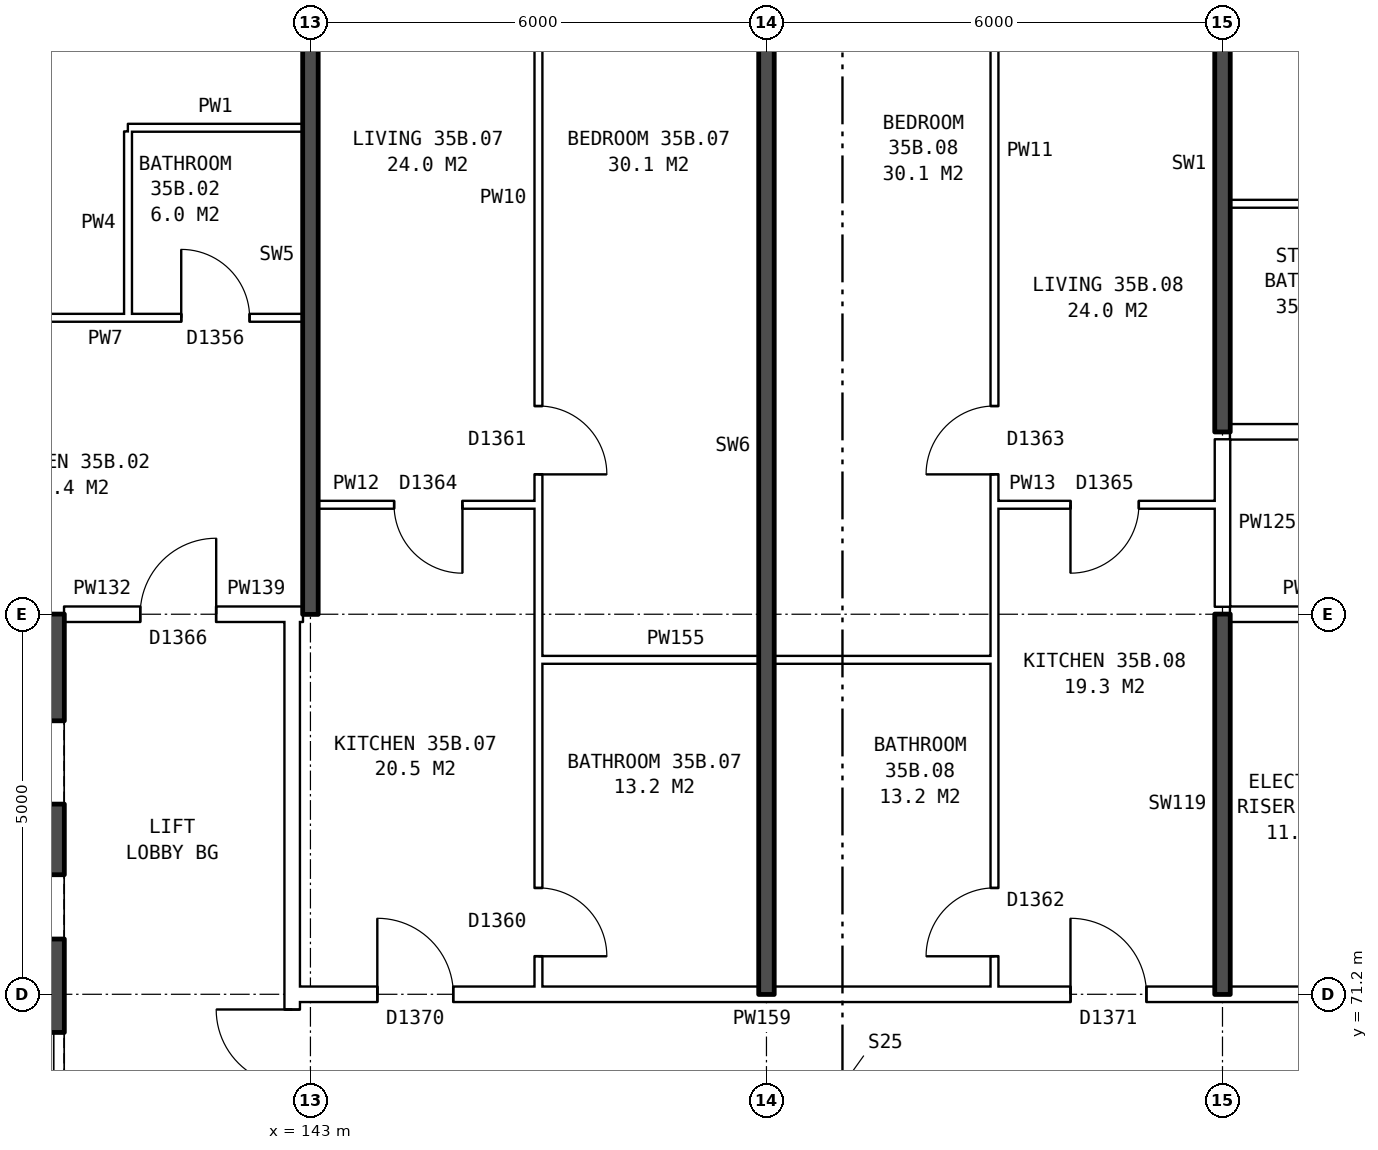
"""IFC4 building model, lengths in metres.
Left out: names, types, materials, properties, quantities, classifications, styles, units other than length and angle.
Written with IfcOpenShell. Run it as: python <this file> out.ifc"""

import sys

from ifc_helpers import new_model, si_unit, direction, frame, frame_2d, origin, place, context, subcontext, project, spatial, rectangle, extrude, element, fill, save


model = new_model("IFC4")
c1 = context("Model", 3, precision=1e-05, world=origin(), true_north=direction((0.0, 1.0)))
c2 = subcontext(c1, "Body", "Model", "MODEL_VIEW")
j1 = project(units=[si_unit("LENGTHUNIT", "METRE"), si_unit("PLANEANGLEUNIT", "RADIAN")], contexts=[c1])
p1 = place(None, origin())
s1 = spatial("IfcSite", under=j1, at=p1, CompositionType="ELEMENT")
p2 = place(p1, origin())
s2 = spatial("IfcBuilding", under=s1, at=p2, CompositionType="ELEMENT")
p3 = place(p2, frame((0.0, 0.0, 126.8)))
s3 = spatial("IfcBuildingStorey", under=s2, at=p3, CompositionType="ELEMENT", Elevation=126.8)
p4 = place(p3, frame((139.485, 63.8, 0.0), z_axis=(0.0, 0.0, 1.0), x_axis=(0.0, 1.0, 0.0)))
e1 = element("IfcWall", 1, at=p4, inside=s3, PredefinedType="SHEAR", context=c2, shape_type="SweptSolid", body=[
    extrude(rectangle(XDim=12.4, YDim=0.55, at=frame_2d((6.2, 0.0))), origin(), (0.0, 0.0, 1.0), 2.85),
])
p5 = place(p4, frame((1.325, 0.0, 0.0)))
e2 = element("IfcOpeningElement", 2, at=p5, cuts=e1, PredefinedType="OPENING", context=c2, shape_type="SweptSolid", body=[
    extrude(rectangle(XDim=1.1, YDim=2.1, at=frame_2d((0.55, 1.05))), frame((0.0, 0.285, 0.0), z_axis=(0.0, -1.0, 0.0), x_axis=(1.0, 0.0, 0.0)), (0.0, 0.0, 1.0), 0.57),
])
p6 = place(p4, frame((3.6, 0.0, 0.0)))
e3 = element("IfcOpeningElement", 3, at=p6, cuts=e1, PredefinedType="OPENING", context=c2, shape_type="SweptSolid", body=[
    extrude(rectangle(XDim=1.1, YDim=2.1, at=frame_2d((0.55, 1.05))), frame((0.0, 0.285, 0.0), z_axis=(0.0, -1.0, 0.0), x_axis=(1.0, 0.0, 0.0)), (0.0, 0.0, 1.0), 0.57),
])
p7 = place(p4, frame((5.8, 0.0, 0.0)))
e4 = element("IfcOpeningElement", 4, at=p7, cuts=e1, PredefinedType="OPENING", context=c2, shape_type="SweptSolid", body=[
    extrude(rectangle(XDim=1.1, YDim=2.1, at=frame_2d((0.55, 1.05))), frame((0.0, 0.285, 0.0), z_axis=(0.0, -1.0, 0.0), x_axis=(1.0, 0.0, 0.0)), (0.0, 0.0, 1.0), 0.57),
])
p8 = place(p4, frame((9.9, 0.0, 0.0)))
e5 = element("IfcOpeningElement", 5, at=p8, cuts=e1, PredefinedType="OPENING", context=c2, shape_type="SweptSolid", body=[
    extrude(rectangle(XDim=1.1, YDim=2.1, at=frame_2d((0.55, 1.05))), frame((0.0, 0.285, 0.0), z_axis=(0.0, -1.0, 0.0), x_axis=(1.0, 0.0, 0.0)), (0.0, 0.0, 1.0), 0.57),
])
p9 = place(p4, frame((8.125, 0.0, 0.0)))
e6 = element("IfcOpeningElement", 6, at=p9, cuts=e1, PredefinedType="OPENING", context=c2, shape_type="SweptSolid", body=[
    extrude(rectangle(XDim=0.85, YDim=2.1, at=frame_2d((0.425, 1.05))), frame((0.0, 0.285, 0.0), z_axis=(0.0, -1.0, 0.0), x_axis=(1.0, 0.0, 0.0)), (0.0, 0.0, 1.0), 0.57),
])
p10 = place(p3, frame((142.76, 63.9, 0.0), z_axis=(0.0, 0.0, 1.0), x_axis=(0.0, 1.0, 0.0)))
e7 = element("IfcWall", 7, at=p10, inside=s3, PredefinedType="PARTITIONING", context=c2, shape_type="SweptSolid", body=[
    extrude(rectangle(XDim=12.2, YDim=0.2, at=frame_2d((6.1, 0.0))), origin(), (0.0, 0.0, 1.0), 2.85),
])
p11 = place(p10, frame((5.1, 0.0, 0.0)))
e8 = element("IfcOpeningElement", 8, at=p11, cuts=e7, PredefinedType="OPENING", context=c2, shape_type="SweptSolid", body=[
    extrude(rectangle(XDim=2.0, YDim=2.1, at=frame_2d((1.0, 1.05))), frame((0.0, 0.11, 0.0), z_axis=(0.0, -1.0, 0.0), x_axis=(1.0, 0.0, 0.0)), (0.0, 0.0, 1.0), 0.22),
])
p12 = place(p3, frame((142.76, 71.2, 0.0), z_axis=(0.0, 0.0, 1.0), x_axis=(1.0, 0.0, 0.0)))
e9 = element("IfcWall", 9, at=p12, inside=s3, PredefinedType="PARTITIONING", context=c2, shape_type="SweptSolid", body=[
    extrude(rectangle(XDim=14.48, YDim=0.2, at=frame_2d((7.24, 0.0))), origin(), (0.0, 0.0, 1.0), 2.85),
])
p13 = place(p12, frame((1.12, 0.0, 0.0)))
e10 = element("IfcOpeningElement", 10, at=p13, cuts=e9, PredefinedType="OPENING", context=c2, shape_type="SweptSolid", body=[
    extrude(rectangle(XDim=1.0, YDim=2.1, at=frame_2d((0.5, 1.05))), frame((0.0, 0.11, 0.0), z_axis=(0.0, -1.0, 0.0), x_axis=(1.0, 0.0, 0.0)), (0.0, 0.0, 1.0), 0.22),
])
p14 = place(p12, frame((10.24, 0.0, 0.0)))
e11 = element("IfcOpeningElement", 11, at=p14, cuts=e9, PredefinedType="OPENING", context=c2, shape_type="SweptSolid", body=[
    extrude(rectangle(XDim=1.0, YDim=2.1, at=frame_2d((0.5, 1.05))), frame((0.0, 0.11, 0.0), z_axis=(0.0, -1.0, 0.0), x_axis=(1.0, 0.0, 0.0)), (0.0, 0.0, 1.0), 0.22),
])
p15 = place(p3, frame((146.0, 75.6, 0.0), z_axis=(0.0, 0.0, 1.0), x_axis=(1.0, 0.0, 0.0)))
e12 = element("IfcWall", 12, at=p15, inside=s3, PredefinedType="PARTITIONING", context=c2, shape_type="SweptSolid", body=[
    extrude(rectangle(XDim=6.0, YDim=0.1, at=frame_2d((3.0, 0.0))), origin(), (0.0, 0.0, 1.0), 2.85),
])
p16 = place(p3, frame((139.76, 76.2, 0.0), z_axis=(0.0, 0.0, 1.0), x_axis=(1.0, 0.0, 0.0)))
e13 = element("IfcWall", 13, at=p16, inside=s3, PredefinedType="PARTITIONING", context=c2, shape_type="SweptSolid", body=[
    extrude(rectangle(XDim=3.0, YDim=0.2, at=frame_2d((1.5, 0.0))), origin(), (0.0, 0.0, 1.0), 2.85),
])
p17 = place(p16, frame((1.0, 0.0, 0.0)))
e14 = element("IfcOpeningElement", 14, at=p17, cuts=e13, PredefinedType="OPENING", context=c2, shape_type="SweptSolid", body=[
    extrude(rectangle(XDim=1.0, YDim=2.1, at=frame_2d((0.5, 1.05))), frame((0.0, 0.11, 0.0), z_axis=(0.0, -1.0, 0.0), x_axis=(1.0, 0.0, 0.0)), (0.0, 0.0, 1.0), 0.22),
])
p18 = place(p3, frame((142.76, 76.2, 0.0), z_axis=(0.0, 0.0, 1.0), x_axis=(1.0, 0.0, 0.0)))
e15 = element("IfcWall", 15, at=p18, inside=s3, PredefinedType="PARTITIONING", context=c2, shape_type="SweptSolid", body=[
    extrude(rectangle(XDim=0.14, YDim=0.2, at=frame_2d((0.07, 0.0))), origin(), (0.0, 0.0, 1.0), 2.85),
])
p19 = place(p3, frame((155.1, 76.2, 0.0), z_axis=(0.0, 0.0, 1.0), x_axis=(1.0, 0.0, 0.0)))
e16 = element("IfcWall", 16, at=p19, inside=s3, PredefinedType="PARTITIONING", context=c2, shape_type="SweptSolid", body=[
    extrude(rectangle(XDim=2.14, YDim=0.2, at=frame_2d((1.07, 0.0))), origin(), (0.0, 0.0, 1.0), 2.85),
])
p20 = place(p3, frame((143.1, 77.64, 0.0), z_axis=(0.0, 0.0, 1.0), x_axis=(1.0, 0.0, 0.0)))
e17 = element("IfcWall", 17, at=p20, inside=s3, PredefinedType="PARTITIONING", context=c2, shape_type="SweptSolid", body=[
    extrude(rectangle(XDim=2.9, YDim=0.1, at=frame_2d((1.45, 0.0))), origin(), (0.0, 0.0, 1.0), 2.85),
])
p21 = place(p20, frame((1.0, 0.0, 0.0)))
e18 = element("IfcOpeningElement", 18, at=p21, cuts=e17, PredefinedType="OPENING", context=c2, shape_type="SweptSolid", body=[
    extrude(rectangle(XDim=0.9, YDim=2.1, at=frame_2d((0.45, 1.05))), frame((0.0, 0.06, 0.0), z_axis=(0.0, -1.0, 0.0), x_axis=(1.0, 0.0, 0.0)), (0.0, 0.0, 1.0), 0.12),
])
p22 = place(p3, frame((152.0, 77.64, 0.0), z_axis=(0.0, 0.0, 1.0), x_axis=(1.0, 0.0, 0.0)))
e19 = element("IfcWall", 19, at=p22, inside=s3, PredefinedType="PARTITIONING", context=c2, shape_type="SweptSolid", body=[
    extrude(rectangle(XDim=2.9, YDim=0.1, at=frame_2d((1.45, 0.0))), origin(), (0.0, 0.0, 1.0), 2.85),
])
p23 = place(p22, frame((1.0, 0.0, 0.0)))
e20 = element("IfcOpeningElement", 20, at=p23, cuts=e19, PredefinedType="OPENING", context=c2, shape_type="SweptSolid", body=[
    extrude(rectangle(XDim=0.9, YDim=2.1, at=frame_2d((0.45, 1.05))), frame((0.0, 0.06, 0.0), z_axis=(0.0, -1.0, 0.0), x_axis=(1.0, 0.0, 0.0)), (0.0, 0.0, 1.0), 0.12),
])
p24 = place(p3, frame((155.1, 78.6, 0.0), z_axis=(0.0, 0.0, 1.0), x_axis=(1.0, 0.0, 0.0)))
e21 = element("IfcWall", 21, at=p24, inside=s3, PredefinedType="PARTITIONING", context=c2, shape_type="SweptSolid", body=[
    extrude(rectangle(XDim=17.29, YDim=0.2, at=frame_2d((8.645, 0.0))), origin(), (0.0, 0.0, 1.0), 2.85),
])
p25 = place(p24, frame((3.6, 0.0, 0.0)))
e22 = element("IfcOpeningElement", 22, at=p25, cuts=e21, PredefinedType="OPENING", context=c2, shape_type="SweptSolid", body=[
    extrude(rectangle(XDim=1.0, YDim=2.1, at=frame_2d((0.5, 1.05))), frame((0.0, 0.11, 0.0), z_axis=(0.0, -1.0, 0.0), x_axis=(1.0, 0.0, 0.0)), (0.0, 0.0, 1.0), 0.22),
])
p26 = place(p24, frame((8.4, 0.0, 0.0)))
e23 = element("IfcOpeningElement", 23, at=p26, cuts=e21, PredefinedType="OPENING", context=c2, shape_type="SweptSolid", body=[
    extrude(rectangle(XDim=1.0, YDim=2.1, at=frame_2d((0.5, 1.05))), frame((0.0, 0.11, 0.0), z_axis=(0.0, -1.0, 0.0), x_axis=(1.0, 0.0, 0.0)), (0.0, 0.0, 1.0), 0.22),
])
p27 = place(p3, frame((137.1, 80.1, 0.0), z_axis=(0.0, 0.0, 1.0), x_axis=(1.0, 0.0, 0.0)))
e24 = element("IfcWall", 24, at=p27, inside=s3, PredefinedType="PARTITIONING", context=c2, shape_type="SweptSolid", body=[
    extrude(rectangle(XDim=5.8, YDim=0.1, at=frame_2d((2.9, 0.0))), origin(), (0.0, 0.0, 1.0), 2.85),
])
p28 = place(p27, frame((1.3, 0.0, 0.0)))
e25 = element("IfcOpeningElement", 25, at=p28, cuts=e24, PredefinedType="OPENING", context=c2, shape_type="SweptSolid", body=[
    extrude(rectangle(XDim=0.9, YDim=2.1, at=frame_2d((0.45, 1.05))), frame((0.0, 0.06, 0.0), z_axis=(0.0, -1.0, 0.0), x_axis=(1.0, 0.0, 0.0)), (0.0, 0.0, 1.0), 0.12),
])
p29 = place(p27, frame((4.2, 0.0, 0.0)))
e26 = element("IfcOpeningElement", 26, at=p29, cuts=e24, PredefinedType="OPENING", context=c2, shape_type="SweptSolid", body=[
    extrude(rectangle(XDim=0.9, YDim=2.1, at=frame_2d((0.45, 1.05))), frame((0.0, 0.06, 0.0), z_axis=(0.0, -1.0, 0.0), x_axis=(1.0, 0.0, 0.0)), (0.0, 0.0, 1.0), 0.12),
])
for number, where, z_axis, x_axis in (
    (27, (155.1, 81.6, 0.0), (0.0, 0.0, 1.0), (1.0, 0.0, 0.0)),
    (28, (140.6, 82.6, 0.0), (0.0, 0.0, 1.0), (1.0, 0.0, 0.0)),
):
    element("IfcWall", number, at=place(p3, frame(where, z_axis=z_axis, x_axis=x_axis)), inside=s3, PredefinedType="PARTITIONING", context=c2, shape_type="SweptSolid", body=[
        extrude(rectangle(XDim=2.3, YDim=0.1, at=frame_2d((1.15, 0.0))), origin(), (0.0, 0.0, 1.0), 2.85),
    ])
p30 = place(p3, frame((140.6, 80.15, 0.0), z_axis=(0.0, 0.0, 1.0), x_axis=(0.0, 1.0, 0.0)))
e29 = element("IfcWall", 29, at=p30, inside=s3, PredefinedType="PARTITIONING", context=c2, shape_type="SweptSolid", body=[
    extrude(rectangle(XDim=2.4, YDim=0.1, at=frame_2d((1.2, 0.0))), origin(), (0.0, 0.0, 1.0), 2.85),
])
p31 = place(p3, frame((143.0, 76.2, 0.0), z_axis=(0.0, 0.0, 1.0), x_axis=(0.0, 1.0, 0.0)))
e30 = element("IfcWall", 30, at=p31, inside=s3, PredefinedType="SOLIDWALL", context=c2, shape_type="SweptSolid", body=[
    extrude(rectangle(XDim=9.44, YDim=0.2, at=frame_2d((4.72, 0.0))), origin(), (0.0, 0.0, 1.0), 2.85),
])
p32 = place(p3, frame((146.0, 71.3, 0.0), z_axis=(0.0, 0.0, 1.0), x_axis=(0.0, 1.0, 0.0)))
e31 = element("IfcWall", 31, at=p32, inside=s3, PredefinedType="PARTITIONING", context=c2, shape_type="SweptSolid", body=[
    extrude(rectangle(XDim=14.34, YDim=0.1, at=frame_2d((7.17, 0.0))), origin(), (0.0, 0.0, 1.0), 2.85),
])
p33 = place(p32, frame((6.74, 0.0, 0.0)))
e32 = element("IfcOpeningElement", 32, at=p33, cuts=e31, PredefinedType="OPENING", context=c2, shape_type="SweptSolid", body=[
    extrude(rectangle(XDim=0.9, YDim=2.1, at=frame_2d((0.45, 1.05))), frame((0.0, 0.06, 0.0), z_axis=(0.0, -1.0, 0.0), x_axis=(1.0, 0.0, 0.0)), (0.0, 0.0, 1.0), 0.12),
])
p34 = place(p32, frame((0.4, 0.0, 0.0)))
e33 = element("IfcOpeningElement", 33, at=p34, cuts=e31, PredefinedType="OPENING", context=c2, shape_type="SweptSolid", body=[
    extrude(rectangle(XDim=0.9, YDim=2.1, at=frame_2d((0.45, 1.05))), frame((0.0, 0.06, 0.0), z_axis=(0.0, -1.0, 0.0), x_axis=(1.0, 0.0, 0.0)), (0.0, 0.0, 1.0), 0.12),
])
p35 = place(p3, frame((149.0, 71.2, 0.0), z_axis=(0.0, 0.0, 1.0), x_axis=(0.0, 1.0, 0.0)))
e34 = element("IfcWall", 34, at=p35, inside=s3, PredefinedType="SOLIDWALL", context=c2, shape_type="SweptSolid", body=[
    extrude(rectangle(XDim=14.44, YDim=0.2, at=frame_2d((7.22, 0.0))), origin(), (0.0, 0.0, 1.0), 2.85),
])
p36 = place(p3, frame((152.0, 71.3, 0.0), z_axis=(0.0, 0.0, 1.0), x_axis=(0.0, 1.0, 0.0)))
e35 = element("IfcWall", 35, at=p36, inside=s3, PredefinedType="PARTITIONING", context=c2, shape_type="SweptSolid", body=[
    extrude(rectangle(XDim=14.34, YDim=0.1, at=frame_2d((7.17, 0.0))), origin(), (0.0, 0.0, 1.0), 2.85),
])
p37 = place(p36, frame((6.74, 0.0, 0.0)))
e36 = element("IfcOpeningElement", 36, at=p37, cuts=e35, PredefinedType="OPENING", context=c2, shape_type="SweptSolid", body=[
    extrude(rectangle(XDim=0.9, YDim=2.1, at=frame_2d((0.45, 1.05))), frame((0.0, 0.06, 0.0), z_axis=(0.0, -1.0, 0.0), x_axis=(1.0, 0.0, 0.0)), (0.0, 0.0, 1.0), 0.12),
])
p38 = place(p36, frame((0.4, 0.0, 0.0)))
e37 = element("IfcOpeningElement", 37, at=p38, cuts=e35, PredefinedType="OPENING", context=c2, shape_type="SweptSolid", body=[
    extrude(rectangle(XDim=0.9, YDim=2.1, at=frame_2d((0.45, 1.05))), frame((0.0, 0.06, 0.0), z_axis=(0.0, -1.0, 0.0), x_axis=(1.0, 0.0, 0.0)), (0.0, 0.0, 1.0), 0.12),
])
p39 = place(p3, frame((155.0, 71.2, 0.0), z_axis=(0.0, 0.0, 1.0), x_axis=(0.0, 1.0, 0.0)))
e38 = element("IfcWall", 38, at=p39, inside=s3, PredefinedType="SOLIDWALL", context=c2, shape_type="SweptSolid", body=[
    extrude(rectangle(XDim=5.0, YDim=0.2, at=frame_2d((2.5, 0.0))), origin(), (0.0, 0.0, 1.0), 2.85),
])
p40 = place(p3, frame((155.0, 76.3, 0.0), z_axis=(0.0, 0.0, 1.0), x_axis=(0.0, 1.0, 0.0)))
e39 = element("IfcWall", 39, at=p40, inside=s3, PredefinedType="PARTITIONING", context=c2, shape_type="SweptSolid", body=[
    extrude(rectangle(XDim=2.2, YDim=0.2, at=frame_2d((1.1, 0.0))), origin(), (0.0, 0.0, 1.0), 2.85),
])
p41 = place(p3, frame((155.0, 78.6, 0.0), z_axis=(0.0, 0.0, 1.0), x_axis=(0.0, 1.0, 0.0)))
e40 = element("IfcWall", 40, at=p41, inside=s3, PredefinedType="SOLIDWALL", context=c2, shape_type="SweptSolid", body=[
    extrude(rectangle(XDim=7.04, YDim=0.2, at=frame_2d((3.52, 0.0))), origin(), (0.0, 0.0, 1.0), 2.85),
])
p42 = place(p11, origin())
e41 = element("IfcDoor", 41, at=p42, inside=s3, OperationType="DOUBLE_DOOR_SINGLE_SWING", PredefinedType="DOOR", context=c2, shape_type="SweptSolid", body=[
    extrude(rectangle(XDim=2.0, YDim=2.1, at=frame_2d((1.0, 1.05))), frame((0.0, 0.025, 0.0), z_axis=(0.0, -1.0, 0.0), x_axis=(1.0, 0.0, 0.0)), (0.0, 0.0, 1.0), 0.05),
])
fill(e8, e41)
p43 = place(p17, origin())
e42 = element("IfcDoor", 42, at=p43, inside=s3, OperationType="SINGLE_SWING_RIGHT", PredefinedType="DOOR", context=c2, shape_type="SweptSolid", body=[
    extrude(rectangle(XDim=1.0, YDim=2.1, at=frame_2d((0.5, 1.05))), frame((0.0, 0.025, 0.0), z_axis=(0.0, -1.0, 0.0), x_axis=(1.0, 0.0, 0.0)), (0.0, 0.0, 1.0), 0.05),
])
fill(e14, e42)
p44 = place(p29, origin())
e43 = element("IfcDoor", 43, at=p44, inside=s3, OperationType="SINGLE_SWING_LEFT", PredefinedType="DOOR", context=c2, shape_type="SweptSolid", body=[
    extrude(rectangle(XDim=0.9, YDim=2.1, at=frame_2d((0.45, 1.05))), frame((0.0, 0.025, 0.0), z_axis=(0.0, -1.0, 0.0), x_axis=(1.0, 0.0, 0.0)), (0.0, 0.0, 1.0), 0.05),
])
fill(e26, e43)
p45 = place(p33, frame((0.9, 0.0, 0.0), z_axis=(0.0, 0.0, 1.0), x_axis=(-1.0, 0.0, 0.0)))
e44 = element("IfcDoor", 44, at=p45, inside=s3, OperationType="SINGLE_SWING_RIGHT", PredefinedType="DOOR", context=c2, shape_type="SweptSolid", body=[
    extrude(rectangle(XDim=0.9, YDim=2.1, at=frame_2d((0.45, 1.05))), frame((0.0, 0.025, 0.0), z_axis=(0.0, -1.0, 0.0), x_axis=(1.0, 0.0, 0.0)), (0.0, 0.0, 1.0), 0.05),
])
fill(e32, e44)
p46 = place(p13, origin())
e45 = element("IfcDoor", 45, at=p46, inside=s3, OperationType="SINGLE_SWING_LEFT", PredefinedType="DOOR", context=c2, shape_type="SweptSolid", body=[
    extrude(rectangle(XDim=1.0, YDim=2.1, at=frame_2d((0.5, 1.05))), frame((0.0, 0.025, 0.0), z_axis=(0.0, -1.0, 0.0), x_axis=(1.0, 0.0, 0.0)), (0.0, 0.0, 1.0), 0.05),
])
fill(e10, e45)
p47 = place(p21, frame((0.9, 0.0, 0.0), z_axis=(0.0, 0.0, 1.0), x_axis=(-1.0, 0.0, 0.0)))
e46 = element("IfcDoor", 46, at=p47, inside=s3, OperationType="SINGLE_SWING_LEFT", PredefinedType="DOOR", context=c2, shape_type="SweptSolid", body=[
    extrude(rectangle(XDim=0.9, YDim=2.1, at=frame_2d((0.45, 1.05))), frame((0.0, 0.025, 0.0), z_axis=(0.0, -1.0, 0.0), x_axis=(1.0, 0.0, 0.0)), (0.0, 0.0, 1.0), 0.05),
])
fill(e18, e46)
p48 = place(p34, frame((0.9, 0.0, 0.0), z_axis=(0.0, 0.0, 1.0), x_axis=(-1.0, 0.0, 0.0)))
e47 = element("IfcDoor", 47, at=p48, inside=s3, OperationType="SINGLE_SWING_RIGHT", PredefinedType="DOOR", context=c2, shape_type="SweptSolid", body=[
    extrude(rectangle(XDim=0.9, YDim=2.1, at=frame_2d((0.45, 1.05))), frame((0.0, 0.025, 0.0), z_axis=(0.0, -1.0, 0.0), x_axis=(1.0, 0.0, 0.0)), (0.0, 0.0, 1.0), 0.05),
])
fill(e33, e47)
p49 = place(p37, origin())
e48 = element("IfcDoor", 48, at=p49, inside=s3, OperationType="SINGLE_SWING_LEFT", PredefinedType="DOOR", context=c2, shape_type="SweptSolid", body=[
    extrude(rectangle(XDim=0.9, YDim=2.1, at=frame_2d((0.45, 1.05))), frame((0.0, 0.025, 0.0), z_axis=(0.0, -1.0, 0.0), x_axis=(1.0, 0.0, 0.0)), (0.0, 0.0, 1.0), 0.05),
])
fill(e36, e48)
p50 = place(p14, origin())
e49 = element("IfcDoor", 49, at=p50, inside=s3, OperationType="SINGLE_SWING_LEFT", PredefinedType="DOOR", context=c2, shape_type="SweptSolid", body=[
    extrude(rectangle(XDim=1.0, YDim=2.1, at=frame_2d((0.5, 1.05))), frame((0.0, 0.025, 0.0), z_axis=(0.0, -1.0, 0.0), x_axis=(1.0, 0.0, 0.0)), (0.0, 0.0, 1.0), 0.05),
])
fill(e11, e49)
p51 = place(p23, frame((0.9, 0.0, 0.0), z_axis=(0.0, 0.0, 1.0), x_axis=(-1.0, 0.0, 0.0)))
e50 = element("IfcDoor", 50, at=p51, inside=s3, OperationType="SINGLE_SWING_RIGHT", PredefinedType="DOOR", context=c2, shape_type="SweptSolid", body=[
    extrude(rectangle(XDim=0.9, YDim=2.1, at=frame_2d((0.45, 1.05))), frame((0.0, 0.025, 0.0), z_axis=(0.0, -1.0, 0.0), x_axis=(1.0, 0.0, 0.0)), (0.0, 0.0, 1.0), 0.05),
])
fill(e20, e50)
p52 = place(p38, origin())
e51 = element("IfcDoor", 51, at=p52, inside=s3, OperationType="SINGLE_SWING_LEFT", PredefinedType="DOOR", context=c2, shape_type="SweptSolid", body=[
    extrude(rectangle(XDim=0.9, YDim=2.1, at=frame_2d((0.45, 1.05))), frame((0.0, 0.025, 0.0), z_axis=(0.0, -1.0, 0.0), x_axis=(1.0, 0.0, 0.0)), (0.0, 0.0, 1.0), 0.05),
])
fill(e37, e51)
save(model, sys.argv[1])
